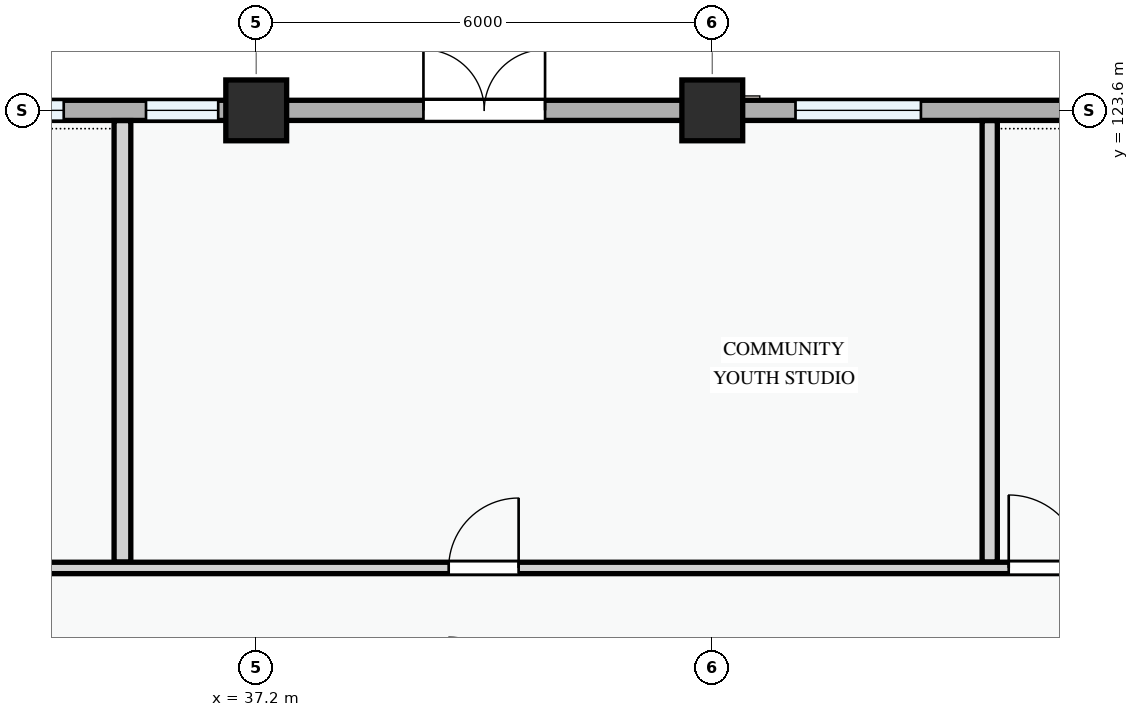
"""IFC4 building model, lengths in metres.
Left out: names, types, materials, properties, quantities, classifications, styles, units other than length and angle.
Written with IfcOpenShell. Run it as: python <this file> out.ifc"""

import sys

from ifc_helpers import new_model, si_unit, direction, frame, frame_2d, origin, origin_2d, place, context, subcontext, project, spatial, rectangle, extrude, element, fill, save


model = new_model("IFC4")
c1 = context("Model", 3, precision=1e-05, world=origin(), true_north=direction((0.0, 1.0)))
c2 = subcontext(c1, "Body", "Model", "MODEL_VIEW")
j1 = project(units=[si_unit("LENGTHUNIT", "METRE"), si_unit("PLANEANGLEUNIT", "RADIAN")], contexts=[c1])
p1 = place(None, origin())
s1 = spatial("IfcSite", under=j1, at=p1, CompositionType="ELEMENT")
p2 = place(p1, origin())
s2 = spatial("IfcBuilding", under=s1, at=p2, CompositionType="ELEMENT")
p3 = place(p2, origin())
s3 = spatial("IfcBuildingStorey", under=s2, at=p3, CompositionType="ELEMENT", Elevation=0.0)
for number, where, z_axis, x_axis in (
    (1, (37.2, 123.6, 0.0), (0.0, 0.0, 1.0), (1.0, 0.0, 0.0)),
    (2, (43.2, 123.6, 0.0), (0.0, 0.0, 1.0), (1.0, 0.0, 0.0)),
):
    element("IfcColumn", number, at=place(p3, frame(where, z_axis=z_axis, x_axis=x_axis)), inside=s3, PredefinedType="COLUMN", context=c2, shape_type="SweptSolid", body=[
        extrude(rectangle(XDim=0.8, YDim=0.8, at=origin_2d()), origin(), (0.0, 0.0, 1.0), 4.5),
    ])
p4 = place(p3, frame((51.6, 123.6, 0.0), z_axis=(0.0, 0.0, 1.0), x_axis=(-1.0, 0.0, 0.0)))
e3 = element("IfcWall", 3, at=p4, inside=s3, PredefinedType="STANDARD", context=c2, shape_type="SweptSolid", body=[
    extrude(rectangle(XDim=8.4, YDim=0.265, at=frame_2d((4.2, 0.0))), origin(), (0.0, 0.0, 1.0), 3.485),
])
p5 = place(p4, frame((1.72, 0.0, 0.78)))
e4 = element("IfcOpeningElement", 4, at=p5, cuts=e3, PredefinedType="OPENING", context=c2, shape_type="SweptSolid", body=[
    extrude(rectangle(XDim=1.5, YDim=1.5, at=frame_2d((0.75, 0.75))), frame((0.0, 0.143, 0.0), z_axis=(0.0, -1.0, 0.0), x_axis=(1.0, 0.0, 0.0)), (0.0, 0.0, 1.0), 0.285),
])
p6 = place(p4, frame((5.655, 0.0, 0.78)))
e5 = element("IfcOpeningElement", 5, at=p6, cuts=e3, PredefinedType="OPENING", context=c2, shape_type="SweptSolid", body=[
    extrude(rectangle(XDim=1.65, YDim=1.5, at=frame_2d((0.825, 0.75))), frame((0.0, 0.143, 0.0), z_axis=(0.0, -1.0, 0.0), x_axis=(1.0, 0.0, 0.0)), (0.0, 0.0, 1.0), 0.285),
])
p7 = place(p3, frame((43.2, 123.6, 0.0), z_axis=(0.0, 0.0, 1.0), x_axis=(-1.0, 0.0, 0.0)))
e6 = element("IfcWall", 6, at=p7, inside=s3, PredefinedType="STANDARD", context=c2, shape_type="SweptSolid", body=[
    extrude(rectangle(XDim=6.0, YDim=0.265, at=frame_2d((3.0, 0.0))), origin(), (0.0, 0.0, 1.0), 3.585),
])
p8 = place(p7, frame((2.2, 0.0, 0.0)))
e7 = element("IfcOpeningElement", 7, at=p8, cuts=e6, PredefinedType="OPENING", context=c2, shape_type="SweptSolid", body=[
    extrude(rectangle(XDim=1.6, YDim=2.35, at=frame_2d((0.8, 1.175))), frame((0.0, 0.143, 0.0), z_axis=(0.0, -1.0, 0.0), x_axis=(1.0, 0.0, 0.0)), (0.0, 0.0, 1.0), 0.285),
])
p9 = place(p3, frame((37.2, 123.6, 0.0), z_axis=(0.0, 0.0, 1.0), x_axis=(-1.0, 0.0, 0.0)))
e8 = element("IfcWall", 8, at=p9, inside=s3, PredefinedType="STANDARD", context=c2, shape_type="SweptSolid", body=[
    extrude(rectangle(XDim=8.4, YDim=0.265, at=frame_2d((4.2, 0.0))), origin(), (0.0, 0.0, 1.0), 3.485),
])
p10 = place(p9, frame((0.5, 0.0, 0.78)))
e9 = element("IfcOpeningElement", 9, at=p10, cuts=e8, PredefinedType="OPENING", context=c2, shape_type="SweptSolid", body=[
    extrude(rectangle(XDim=0.95, YDim=1.15, at=frame_2d((0.475, 0.575))), frame((0.0, 0.143, 0.0), z_axis=(0.0, -1.0, 0.0), x_axis=(1.0, 0.0, 0.0)), (0.0, 0.0, 1.0), 0.285),
])
p11 = place(p9, frame((2.532, 0.0, 0.78)))
e10 = element("IfcOpeningElement", 10, at=p11, cuts=e8, PredefinedType="OPENING", context=c2, shape_type="SweptSolid", body=[
    extrude(rectangle(XDim=1.75, YDim=1.45, at=frame_2d((0.875, 0.725))), frame((0.0, 0.143, 0.0), z_axis=(0.0, -1.0, 0.0), x_axis=(1.0, 0.0, 0.0)), (0.0, 0.0, 1.0), 0.285),
])
p12 = place(p9, frame((5.562, 0.0, 0.78)))
e11 = element("IfcOpeningElement", 11, at=p12, cuts=e8, PredefinedType="OPENING", context=c2, shape_type="SweptSolid", body=[
    extrude(rectangle(XDim=2.0, YDim=1.75, at=frame_2d((1.0, 0.875))), frame((0.0, 0.143, 0.0), z_axis=(0.0, -1.0, 0.0), x_axis=(1.0, 0.0, 0.0)), (0.0, 0.0, 1.0), 0.285),
])
p13 = place(p3, frame((35.44, 117.657, 0.0), z_axis=(0.0, 0.0, 1.0), x_axis=(0.0, 1.0, 0.0)))
e12 = element("IfcWall", 12, at=p13, inside=s3, PredefinedType="PARTITIONING", context=c2, shape_type="SweptSolid", body=[
    extrude(rectangle(XDim=5.809, YDim=0.22, at=frame_2d((2.904, 0.0))), origin(), (0.0, 0.0, 1.0), 4.2),
])
p14 = place(p3, frame((46.85, 117.657, 0.0), z_axis=(0.0, 0.0, 1.0), x_axis=(0.0, 1.0, 0.0)))
e13 = element("IfcWall", 13, at=p14, inside=s3, PredefinedType="PARTITIONING", context=c2, shape_type="SweptSolid", body=[
    extrude(rectangle(XDim=5.809, YDim=0.2, at=frame_2d((2.904, 0.0))), origin(), (0.0, 0.0, 1.0), 4.2),
])
p15 = place(p3, frame((22.66, 117.58, 0.0), z_axis=(0.0, 0.0, 1.0), x_axis=(1.0, 0.0, 0.0)))
e14 = element("IfcWall", 14, at=p15, inside=s3, PredefinedType="PARTITIONING", context=c2, shape_type="SweptSolid", body=[
    extrude(rectangle(XDim=34.806, YDim=0.15, at=frame_2d((17.403, 0.0))), origin(), (0.0, 0.0, 1.0), 4.2),
])
p16 = place(p15, frame((9.914, 0.0, 0.0)))
e15 = element("IfcOpeningElement", 15, at=p16, cuts=e14, PredefinedType="OPENING", context=c2, shape_type="SweptSolid", body=[
    extrude(rectangle(XDim=0.92, YDim=2.1, at=frame_2d((0.46, 1.05))), frame((0.0, 0.085, 0.0), z_axis=(0.0, -1.0, 0.0), x_axis=(1.0, 0.0, 0.0)), (0.0, 0.0, 1.0), 0.17),
])
p17 = place(p15, frame((17.072, 0.0, 0.0)))
e16 = element("IfcOpeningElement", 16, at=p17, cuts=e14, PredefinedType="OPENING", context=c2, shape_type="SweptSolid", body=[
    extrude(rectangle(XDim=0.92, YDim=2.1, at=frame_2d((0.46, 1.05))), frame((0.0, 0.085, 0.0), z_axis=(0.0, -1.0, 0.0), x_axis=(1.0, 0.0, 0.0)), (0.0, 0.0, 1.0), 0.17),
])
p18 = place(p15, frame((24.44, 0.0, 0.0)))
e17 = element("IfcOpeningElement", 17, at=p18, cuts=e14, PredefinedType="OPENING", context=c2, shape_type="SweptSolid", body=[
    extrude(rectangle(XDim=0.96, YDim=2.12, at=frame_2d((0.48, 1.06))), frame((0.0, 0.085, 0.0), z_axis=(0.0, -1.0, 0.0), x_axis=(1.0, 0.0, 0.0)), (0.0, 0.0, 1.0), 0.17),
])
p19 = place(p6, origin())
e18 = element("IfcWindow", 18, at=p19, inside=s3, PartitioningType="DOUBLE_PANEL_VERTICAL", PredefinedType="WINDOW", context=c2, shape_type="SweptSolid", body=[
    extrude(rectangle(XDim=1.65, YDim=1.5, at=frame_2d((0.825, 0.75))), frame((0.0, 0.03, 0.0), z_axis=(0.0, -1.0, 0.0), x_axis=(1.0, 0.0, 0.0)), (0.0, 0.0, 1.0), 0.06),
])
fill(e5, e18)
p20 = place(p8, frame((1.6, 0.0, 0.0), z_axis=(0.0, 0.0, 1.0), x_axis=(-1.0, 0.0, 0.0)))
e19 = element("IfcDoor", 19, at=p20, inside=s3, OperationType="DOUBLE_DOOR_SINGLE_SWING", PredefinedType="DOOR", context=c2, shape_type="SweptSolid", body=[
    extrude(rectangle(XDim=1.6, YDim=2.35, at=frame_2d((0.8, 1.175))), frame((0.0, 0.025, 0.0), z_axis=(0.0, -1.0, 0.0), x_axis=(1.0, 0.0, 0.0)), (0.0, 0.0, 1.0), 0.05),
])
fill(e7, e19)
p21 = place(p10, origin())
e20 = element("IfcWindow", 20, at=p21, inside=s3, PartitioningType="SINGLE_PANEL", PredefinedType="WINDOW", context=c2, shape_type="SweptSolid", body=[
    extrude(rectangle(XDim=0.95, YDim=1.15, at=frame_2d((0.475, 0.575))), frame((0.0, 0.03, 0.0), z_axis=(0.0, -1.0, 0.0), x_axis=(1.0, 0.0, 0.0)), (0.0, 0.0, 1.0), 0.06),
])
fill(e9, e20)
p22 = place(p11, origin())
e21 = element("IfcWindow", 21, at=p22, inside=s3, PartitioningType="DOUBLE_PANEL_VERTICAL", PredefinedType="WINDOW", context=c2, shape_type="SweptSolid", body=[
    extrude(rectangle(XDim=1.75, YDim=1.45, at=frame_2d((0.875, 0.725))), frame((0.0, 0.03, 0.0), z_axis=(0.0, -1.0, 0.0), x_axis=(1.0, 0.0, 0.0)), (0.0, 0.0, 1.0), 0.06),
])
fill(e10, e21)
p23 = place(p17, origin())
e22 = element("IfcDoor", 22, at=p23, inside=s3, OperationType="SINGLE_SWING_RIGHT", PredefinedType="DOOR", context=c2, shape_type="SweptSolid", body=[
    extrude(rectangle(XDim=0.92, YDim=2.1, at=frame_2d((0.46, 1.05))), frame((0.0, 0.025, 0.0), z_axis=(0.0, -1.0, 0.0), x_axis=(1.0, 0.0, 0.0)), (0.0, 0.0, 1.0), 0.05),
])
fill(e16, e22)
p24 = place(p18, origin())
e23 = element("IfcDoor", 23, at=p24, inside=s3, OperationType="SINGLE_SWING_LEFT", PredefinedType="DOOR", context=c2, shape_type="SweptSolid", body=[
    extrude(rectangle(XDim=0.96, YDim=2.12, at=frame_2d((0.48, 1.06))), frame((0.0, 0.025, 0.0), z_axis=(0.0, -1.0, 0.0), x_axis=(1.0, 0.0, 0.0)), (0.0, 0.0, 1.0), 0.05),
])
fill(e17, e23)
save(model, sys.argv[1])
